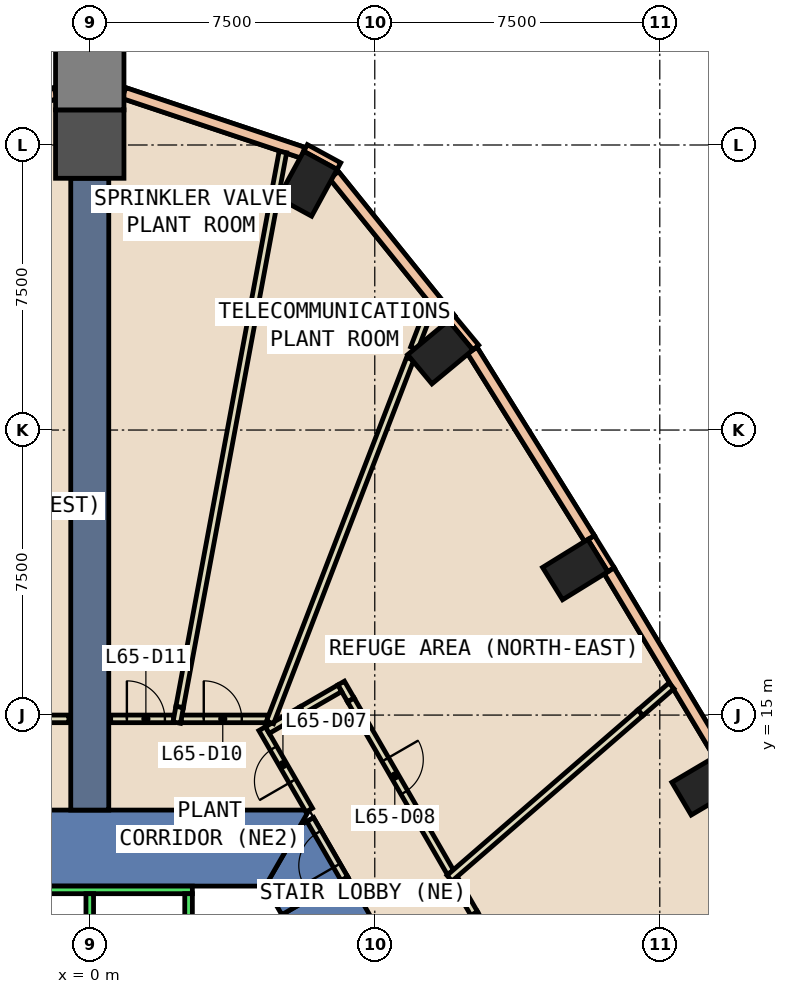
"""IFC4 building model, lengths in metres.
Left out: names, types, materials, properties, quantities, classifications, styles, units other than length and angle.
Written with IfcOpenShell. Run it as: python <this file> out.ifc"""

import sys

from ifc_helpers import new_model, si_unit, direction, frame, frame_2d, origin, origin_2d, place, context, subcontext, project, spatial, polyline, rectangle, outline, extrude, element, fill, save


model = new_model("IFC4")
c1 = context("Model", 3, precision=1e-05, world=origin(), true_north=direction((0.0, 1.0)))
c2 = subcontext(c1, "Body", "Model", "MODEL_VIEW")
j1 = project(units=[si_unit("LENGTHUNIT", "METRE"), si_unit("PLANEANGLEUNIT", "RADIAN")], contexts=[c1])
p1 = place(None, origin())
s1 = spatial("IfcSite", under=j1, at=p1, CompositionType="ELEMENT")
p2 = place(p1, origin())
s2 = spatial("IfcBuilding", under=s1, at=p2, CompositionType="ELEMENT")
p3 = place(p2, frame((0.0, 0.0, 281.0)))
s3 = spatial("IfcBuildingStorey", under=s2, at=p3, CompositionType="ELEMENT", Elevation=281.0)
for number, where, z_axis, x_axis in (
    (1, (16.175, 13.156, -0.6), (0.0, 0.0, 1.0), (-0.509, 0.861, 0.0)),
    (2, (12.774, 18.828, -0.6), (0.0, 0.0, 1.0), (-0.526, 0.851, 0.0)),
    (3, (9.223, 24.546, -0.6), (0.0, 0.0, 1.0), (-0.639, 0.769, 0.0)),
    (4, (5.734, 28.981, -0.6), (0.0, 0.0, 1.0), (-0.878, 0.478, 0.0)),
):
    element("IfcColumn", number, at=place(p3, frame(where, z_axis=z_axis, x_axis=x_axis)), inside=s3, PredefinedType="COLUMN", context=c2, shape_type="SweptSolid", body=[
        extrude(rectangle(XDim=1.0, YDim=1.4, at=origin_2d()), origin(), (0.0, 0.0, 1.0), 5.4),
    ])
for number, where, z_axis, x_axis in (
    (5, (0.0, 30.024, -0.6), (0.0, 0.0, 1.0), (0.0, 1.0, 0.0)),
    (6, (0.0, 31.824, -0.6), (0.0, 0.0, 1.0), (0.0, 1.0, 0.0)),
):
    element("IfcColumn", number, at=place(p3, frame(where, z_axis=z_axis, x_axis=x_axis)), inside=s3, PredefinedType="COLUMN", context=c2, shape_type="SweptSolid", body=[
        extrude(rectangle(XDim=1.8, YDim=1.8, at=origin_2d()), origin(), (0.0, 0.0, 1.0), 5.4),
    ])
p4 = place(p3, frame((0.0, 0.0, -0.6)))
e7 = element("IfcWall", 7, at=p4, inside=s3, PredefinedType="SHEAR", context=c2, shape_type="SweptSolid", body=[
    extrude(outline(polyline([(6.786, 10.747), (5.054, 9.747), (9.238, 2.5), (11.547, 2.5), (6.786, 10.747)])), origin(), (0.0, 0.0, 1.0), 5.4),
])
p5 = place(p3, frame((0.0, 0.0, 3.6)))
e8 = element("IfcWall", 8, at=p5, inside=s3, PredefinedType="SHEAR", context=c2, shape_type="SweptSolid", body=[
    extrude(outline(polyline([(5.889, 12.301), (5.544, 12.102), (4.619, 10.5), (5.054, 9.747), (6.786, 10.747), (5.889, 12.301)])), origin(), (0.0, 0.0, 1.0), 1.2),
])
p6 = place(p3, frame((0.0, 0.0, -0.6)))
e9 = element("IfcWall", 9, at=p6, inside=s3, PredefinedType="SHEAR", context=c2, shape_type="SweptSolid", body=[
    extrude(outline(polyline([(5.774, 12.5), (-5.774, 12.5), (-4.619, 10.5), (4.619, 10.5), (5.774, 12.5)])), origin(), (0.0, 0.0, 1.0), 5.4),
])
p7 = place(p3, frame((0.0, 12.5, 0.0), z_axis=(0.0, 0.0, 1.0), x_axis=(0.0, 1.0, 0.0)))
e10 = element("IfcWall", 10, at=p7, inside=s3, PredefinedType="SHEAR", context=c2, shape_type="SweptSolid", body=[
    extrude(rectangle(XDim=16.624, YDim=1.0, at=frame_2d((8.312, 0.0))), origin(), (0.0, 0.0, 1.0), 4.8),
])
p8 = place(p3, frame((6.556, 29.444, 0.0), z_axis=(0.0, 0.0, 1.0), x_axis=(-0.878250009632, 0.478201757191, 0.0)))
e11 = element("IfcWall", 11, at=p8, inside=s3, PredefinedType="STANDARD", context=c2, shape_type="SweptSolid", body=[
    extrude(rectangle(XDim=1.0, YDim=0.2, at=frame_2d((0.5, 0.0))), origin(), (0.0, 0.0, 1.0), 4.8),
])
p9 = place(p3, frame((13.718, 18.823, 0.0), z_axis=(0.0, 0.0, 1.0), x_axis=(-0.525825307325, 0.850592585306, 0.0)))
e12 = element("IfcWall", 12, at=p9, inside=s3, PredefinedType="STANDARD", context=c2, shape_type="SweptSolid", body=[
    extrude(rectangle(XDim=1.0, YDim=0.2, at=frame_2d((0.5, 0.0))), origin(), (0.0, 0.0, 1.0), 4.8),
])
p10 = place(p3, frame((10.157, 24.672, 0.0), z_axis=(0.0, 0.0, 1.0), x_axis=(-0.638092327136, 0.769959857428, 0.0)))
e13 = element("IfcWall", 13, at=p10, inside=s3, PredefinedType="STANDARD", context=c2, shape_type="SweptSolid", body=[
    extrude(rectangle(XDim=1.0, YDim=0.2, at=frame_2d((0.5, 0.0))), origin(), (0.0, 0.0, 1.0), 4.8),
])
p11 = place(p3, frame((16.564, 13.966, 0.0), z_axis=(0.0, 0.0, 1.0), x_axis=(-0.514272513936, 0.857626831092, 0.0)))
e14 = element("IfcWall", 14, at=p11, inside=s3, PredefinedType="STANDARD", context=c2, shape_type="SweptSolid", body=[
    extrude(rectangle(XDim=5.629, YDim=0.3, at=frame_2d((2.815, 0.0))), origin(), (0.0, 0.0, 1.0), 1.2),
])
p12 = place(p3, frame((16.564, 13.966, 4.0), z_axis=(0.0, 0.0, 1.0), x_axis=(-0.514272513936, 0.857626831092, 0.0)))
e15 = element("IfcWall", 15, at=p12, inside=s3, PredefinedType="STANDARD", context=c2, shape_type="SweptSolid", body=[
    extrude(rectangle(XDim=5.629, YDim=0.3, at=frame_2d((2.815, 0.0))), origin(), (0.0, 0.0, 1.0), 0.8),
])
p13 = place(p3, frame((13.149, 19.646, 0.0), z_axis=(0.0, 0.0, 1.0), x_axis=(-0.528722913279, 0.848794486889, 0.0)))
e16 = element("IfcWall", 16, at=p13, inside=s3, PredefinedType="STANDARD", context=c2, shape_type="SweptSolid", body=[
    extrude(rectangle(XDim=5.833, YDim=0.3, at=frame_2d((2.917, 0.0))), origin(), (0.0, 0.0, 1.0), 1.2),
])
p14 = place(p3, frame((13.149, 19.646, 4.0), z_axis=(0.0, 0.0, 1.0), x_axis=(-0.528722913279, 0.848794486889, 0.0)))
e17 = element("IfcWall", 17, at=p14, inside=s3, PredefinedType="STANDARD", context=c2, shape_type="SweptSolid", body=[
    extrude(rectangle(XDim=5.833, YDim=0.3, at=frame_2d((2.917, 0.0))), origin(), (0.0, 0.0, 1.0), 0.8),
])
p15 = place(p3, frame((9.486, 25.414, 0.0), z_axis=(0.0, 0.0, 1.0), x_axis=(-0.627683908381, 0.778468310954, 0.0)))
e18 = element("IfcWall", 18, at=p15, inside=s3, PredefinedType="STANDARD", context=c2, shape_type="SweptSolid", body=[
    extrude(rectangle(XDim=4.874, YDim=0.3, at=frame_2d((2.437, 0.0))), origin(), (0.0, 0.0, 1.0), 1.2),
])
p16 = place(p3, frame((9.486, 25.414, 4.0), z_axis=(0.0, 0.0, 1.0), x_axis=(-0.627683908381, 0.778468310954, 0.0)))
e19 = element("IfcWall", 19, at=p16, inside=s3, PredefinedType="STANDARD", context=c2, shape_type="SweptSolid", body=[
    extrude(rectangle(XDim=4.874, YDim=0.3, at=frame_2d((2.437, 0.0))), origin(), (0.0, 0.0, 1.0), 0.8),
])
p17 = place(p3, frame((5.611, 29.797, 0.0), z_axis=(0.0, 0.0, 1.0), x_axis=(-0.948737354495, 0.316065550459, 0.0)))
e20 = element("IfcWall", 20, at=p17, inside=s3, PredefinedType="STANDARD", context=c2, shape_type="SweptSolid", body=[
    extrude(rectangle(XDim=4.967, YDim=0.3, at=frame_2d((2.483, 0.0))), origin(), (0.0, 0.0, 1.0), 1.2),
])
p18 = place(p3, frame((5.611, 29.797, 4.0), z_axis=(0.0, 0.0, 1.0), x_axis=(-0.948737354495, 0.316065550459, 0.0)))
e21 = element("IfcWall", 21, at=p18, inside=s3, PredefinedType="STANDARD", context=c2, shape_type="SweptSolid", body=[
    extrude(rectangle(XDim=4.967, YDim=0.3, at=frame_2d((2.483, 0.0))), origin(), (0.0, 0.0, 1.0), 0.8),
])
p19 = place(p3, frame((-0.899, 31.367, 0.0), z_axis=(0.0, 0.0, 1.0), x_axis=(-0.948737354495, -0.316065550459, 0.0)))
e22 = element("IfcWall", 22, at=p19, inside=s3, PredefinedType="STANDARD", context=c2, shape_type="SweptSolid", body=[
    extrude(rectangle(XDim=4.967, YDim=0.3, at=frame_2d((2.483, 0.0))), origin(), (0.0, 0.0, 1.0), 1.2),
])
p20 = place(p3, frame((-0.899, 31.367, 4.0), z_axis=(0.0, 0.0, 1.0), x_axis=(-0.948737354495, -0.316065550459, 0.0)))
e23 = element("IfcWall", 23, at=p20, inside=s3, PredefinedType="STANDARD", context=c2, shape_type="SweptSolid", body=[
    extrude(rectangle(XDim=4.967, YDim=0.3, at=frame_2d((2.483, 0.0))), origin(), (0.0, 0.0, 1.0), 0.8),
])
p21 = place(p3, frame((10.165, 9.693, 0.0), z_axis=(0.0, 0.0, 1.0), x_axis=(-0.865955154139, -0.50012165622, 0.0)))
e24 = element("IfcWall", 24, at=p21, inside=s3, PredefinedType="PARTITIONING", context=c2, shape_type="SweptSolid", body=[
    extrude(rectangle(XDim=2.4, YDim=0.2, at=frame_2d((1.2, 0.0))), origin(), (0.0, 0.0, 1.0), 2.4),
])
p22 = place(p21, frame((0.6, 0.0, 0.0)))
e25 = element("IfcOpeningElement", 25, at=p22, cuts=e24, PredefinedType="OPENING", context=c2, shape_type="SweptSolid", body=[
    extrude(rectangle(XDim=1.0, YDim=2.1, at=frame_2d((0.5, 1.05))), frame((0.0, 0.11, 0.0), z_axis=(0.0, -1.0, 0.0), x_axis=(1.0, 0.0, 0.0)), (0.0, 0.0, 1.0), 0.22),
])
p23 = place(p3, frame((5.774, 12.5, 0.0), z_axis=(0.0, 0.0, 1.0), x_axis=(-0.500024335136, 0.866011353431, 0.0)))
e26 = element("IfcWall", 26, at=p23, inside=s3, PredefinedType="PARTITIONING", context=c2, shape_type="SweptSolid", body=[
    extrude(rectangle(XDim=2.474, YDim=0.2, at=frame_2d((1.237, 0.0))), origin(), (0.0, 0.0, 1.0), 4.8),
])
p24 = place(p23, frame((0.881, 0.0, 0.0)))
e27 = element("IfcOpeningElement", 27, at=p24, cuts=e26, PredefinedType="OPENING", context=c2, shape_type="SweptSolid", body=[
    extrude(rectangle(XDim=1.0, YDim=2.1, at=frame_2d((0.5, 1.05))), frame((0.0, 0.11, 0.0), z_axis=(0.0, -1.0, 0.0), x_axis=(1.0, 0.0, 0.0)), (0.0, 0.0, 1.0), 0.22),
])
p25 = place(p3, frame((4.674, 14.605, 0.0), z_axis=(0.0, 0.0, 1.0), x_axis=(0.865681519127, 0.500595153234, 0.0)))
e28 = element("IfcWall", 28, at=p25, inside=s3, PredefinedType="PARTITIONING", context=c2, shape_type="SweptSolid", body=[
    extrude(rectangle(XDim=0.589, YDim=0.2, at=frame_2d((0.294, 0.0))), origin(), (0.0, 0.0, 1.0), 4.8),
])
p26 = place(p3, frame((6.615, 15.842, 0.0), z_axis=(0.0, 0.0, 1.0), x_axis=(0.499571276714, -0.866272785837, 0.0)))
e29 = element("IfcWall", 29, at=p26, inside=s3, PredefinedType="PARTITIONING", context=c2, shape_type="SweptSolid", body=[
    extrude(rectangle(XDim=0.513, YDim=0.2, at=frame_2d((0.256, 0.0))), origin(), (0.0, 0.0, 1.0), 2.4),
])
p27 = place(p3, frame((5.184, 14.9, 0.0), z_axis=(0.0, 0.0, 1.0), x_axis=(0.865727674389, 0.500515328234, 0.0)))
e30 = element("IfcWall", 30, at=p27, inside=s3, PredefinedType="PARTITIONING", context=c2, shape_type="SweptSolid", body=[
    extrude(rectangle(XDim=0.462, YDim=0.2, at=frame_2d((0.231, 0.0))), origin(), (0.0, 0.0, 1.0), 4.8),
])
p28 = place(p3, frame((9.592, 10.685, 0.0), z_axis=(0.0, 0.0, 1.0), x_axis=(0.500366091518, -0.865813937552, 0.0)))
e31 = element("IfcWall", 31, at=p28, inside=s3, PredefinedType="PARTITIONING", context=c2, shape_type="SweptSolid", body=[
    extrude(rectangle(XDim=0.23, YDim=0.2, at=frame_2d((0.115, 0.0))), origin(), (0.0, 0.0, 1.0), 4.8),
])
p29 = place(p3, frame((10.115, 9.78, 0.0), z_axis=(0.0, 0.0, 1.0), x_axis=(0.500005696091, -0.86602211512, 0.0)))
e32 = element("IfcWall", 32, at=p29, inside=s3, PredefinedType="PARTITIONING", context=c2, shape_type="SweptSolid", body=[
    extrude(rectangle(XDim=5.82, YDim=0.2, at=frame_2d((2.91, 0.0))), origin(), (0.0, 0.0, 1.0), 2.4),
])
p30 = place(p3, frame((2.407, 14.9, 0.0), z_axis=(0.0, 0.0, 1.0), x_axis=(1.0, 0.0, 0.0)))
e33 = element("IfcWall", 33, at=p30, inside=s3, PredefinedType="PARTITIONING", context=c2, shape_type="SweptSolid", body=[
    extrude(rectangle(XDim=2.272, YDim=0.2, at=frame_2d((1.136, 0.0))), origin(), (0.0, 0.0, 1.0), 4.8),
])
p31 = place(p30, frame((0.593, 0.0, 0.0)))
e34 = element("IfcOpeningElement", 34, at=p31, cuts=e33, PredefinedType="OPENING", context=c2, shape_type="SweptSolid", body=[
    extrude(rectangle(XDim=1.0, YDim=2.1, at=frame_2d((0.5, 1.05))), frame((0.0, 0.11, 0.0), z_axis=(0.0, -1.0, 0.0), x_axis=(1.0, 0.0, 0.0)), (0.0, 0.0, 1.0), 0.22),
])
p32 = place(p3, frame((0.55, 14.9, 0.0), z_axis=(0.0, 0.0, 1.0), x_axis=(1.0, 0.0, 0.0)))
e35 = element("IfcWall", 35, at=p32, inside=s3, PredefinedType="PARTITIONING", context=c2, shape_type="SweptSolid", body=[
    extrude(rectangle(XDim=1.657, YDim=0.2, at=frame_2d((0.829, 0.0))), origin(), (0.0, 0.0, 1.0), 4.8),
])
p33 = place(p32, frame((0.427, 0.0, 0.0)))
e36 = element("IfcOpeningElement", 36, at=p33, cuts=e35, PredefinedType="OPENING", context=c2, shape_type="SweptSolid", body=[
    extrude(rectangle(XDim=1.0, YDim=2.1, at=frame_2d((0.5, 1.05))), frame((0.0, 0.11, 0.0), z_axis=(0.0, -1.0, 0.0), x_axis=(1.0, 0.0, 0.0)), (0.0, 0.0, 1.0), 0.22),
])
p34 = place(p3, frame((15.307, 15.77, 0.0), z_axis=(0.0, 0.0, 1.0), x_axis=(-0.755555277279, -0.655084897533, 0.0)))
e37 = element("IfcWall", 37, at=p34, inside=s3, PredefinedType="PARTITIONING", context=c2, shape_type="SweptSolid", body=[
    extrude(rectangle(XDim=1.084, YDim=0.2, at=frame_2d((0.542, 0.0))), origin(), (0.0, 0.0, 1.0), 2.4),
])
p35 = place(p3, frame((4.743, 14.807, 0.0), z_axis=(0.0, 0.0, 1.0), x_axis=(0.359634850081, 0.933093122152, 0.0)))
e38 = element("IfcWall", 38, at=p35, inside=s3, PredefinedType="PARTITIONING", context=c2, shape_type="SweptSolid", body=[
    extrude(rectangle(XDim=10.252, YDim=0.2, at=frame_2d((5.126, 0.0))), origin(), (0.0, 0.0, 1.0), 4.8),
])
p36 = place(p3, frame((8.538, 24.653, 0.0), z_axis=(0.0, 0.0, 1.0), x_axis=(0.359767534995, 0.933041971598, 0.0)))
e39 = element("IfcWall", 39, at=p36, inside=s3, PredefinedType="PARTITIONING", context=c2, shape_type="SweptSolid", body=[
    extrude(rectangle(XDim=1.162, YDim=0.2, at=frame_2d((0.581, 0.0))), origin(), (0.0, 0.0, 1.0), 2.4),
])
p37 = place(p3, frame((2.289, 14.802, 0.0), z_axis=(0.0, 0.0, 1.0), x_axis=(0.183025457922, 0.983108173983, 0.0)))
e40 = element("IfcWall", 40, at=p37, inside=s3, PredefinedType="PARTITIONING", context=c2, shape_type="SweptSolid", body=[
    extrude(rectangle(XDim=0.42, YDim=0.2, at=frame_2d((0.21, 0.0))), origin(), (0.0, 0.0, 1.0), 2.4),
])
p38 = place(p3, frame((0.0, 30.944, 0.0), z_axis=(0.0, 0.0, 1.0), x_axis=(0.0, 1.0, 0.0)))
e41 = element("IfcWall", 41, at=p38, inside=s3, PredefinedType="PARTITIONING", context=c2, shape_type="SweptSolid", body=[
    extrude(rectangle(XDim=0.501, YDim=0.2, at=frame_2d((0.25, 0.0))), origin(), (0.0, 0.0, 1.0), 4.8),
])
p39 = place(p3, frame((6.699, 10.697, 0.0), z_axis=(0.0, 0.0, 1.0), x_axis=(-0.499914839587, 0.866074565589, 0.0)))
e42 = element("IfcWall", 42, at=p39, inside=s3, PredefinedType="PARTITIONING", context=c2, shape_type="SweptSolid", body=[
    extrude(rectangle(XDim=1.794, YDim=0.2, at=frame_2d((0.897, 0.0))), origin(), (0.0, 0.0, 1.0), 2.4),
])
p40 = place(p39, frame((0.397, 0.0, 0.0)))
e43 = element("IfcOpeningElement", 43, at=p40, cuts=e42, PredefinedType="OPENING", context=c2, shape_type="SweptSolid", body=[
    extrude(rectangle(XDim=1.0, YDim=2.1, at=frame_2d((0.5, 1.05))), frame((0.0, 0.11, 0.0), z_axis=(0.0, -1.0, 0.0), x_axis=(1.0, 0.0, 0.0)), (0.0, 0.0, 1.0), 0.22),
])
p41 = place(p3, frame((6.871, 15.398, 0.0), z_axis=(0.0, 0.0, 1.0), x_axis=(0.500031573455, -0.866007174074, 0.0)))
e44 = element("IfcWall", 44, at=p41, inside=s3, PredefinedType="PARTITIONING", context=c2, shape_type="SweptSolid", body=[
    extrude(rectangle(XDim=5.241, YDim=0.2, at=frame_2d((2.621, 0.0))), origin(), (0.0, 0.0, 1.0), 4.8),
])
p42 = place(p41, frame((1.811, 0.0, 0.0)))
e45 = element("IfcOpeningElement", 45, at=p42, cuts=e44, PredefinedType="OPENING", context=c2, shape_type="SweptSolid", body=[
    extrude(rectangle(XDim=1.0, YDim=2.1, at=frame_2d((0.5, 1.05))), frame((0.0, 0.11, 0.0), z_axis=(0.0, -1.0, 0.0), x_axis=(1.0, 0.0, 0.0)), (0.0, 0.0, 1.0), 0.22),
])
p43 = place(p3, frame((5.584, 15.131, 0.0), z_axis=(0.0, 0.0, 1.0), x_axis=(0.865969483213, 0.500096844764, 0.0)))
e46 = element("IfcWall", 46, at=p43, inside=s3, PredefinedType="PARTITIONING", context=c2, shape_type="SweptSolid", body=[
    extrude(rectangle(XDim=1.148, YDim=0.2, at=frame_2d((0.574, 0.0))), origin(), (0.0, 0.0, 1.0), 2.4),
])
p44 = place(p3, frame((9.707, 10.486, 0.0), z_axis=(0.0, 0.0, 1.0), x_axis=(0.500292562113, -0.865856427068, 0.0)))
e47 = element("IfcWall", 47, at=p44, inside=s3, PredefinedType="PARTITIONING", context=c2, shape_type="SweptSolid", body=[
    extrude(rectangle(XDim=0.815, YDim=0.2, at=frame_2d((0.408, 0.0))), origin(), (0.0, 0.0, 1.0), 2.4),
])
p45 = place(p3, frame((14.488, 15.06, 0.0), z_axis=(0.0, 0.0, 1.0), x_axis=(-0.755567874399, -0.65507036811, 0.0)))
e48 = element("IfcWall", 48, at=p45, inside=s3, PredefinedType="PARTITIONING", context=c2, shape_type="SweptSolid", body=[
    extrude(rectangle(XDim=6.647, YDim=0.2, at=frame_2d((3.323, 0.0))), origin(), (0.0, 0.0, 1.0), 4.8),
])
p46 = place(p3, frame((2.366, 15.215, 0.0), z_axis=(0.0, 0.0, 1.0), x_axis=(0.182895721474, 0.983132318188, 0.0)))
e49 = element("IfcWall", 49, at=p46, inside=s3, PredefinedType="PARTITIONING", context=c2, shape_type="SweptSolid", body=[
    extrude(rectangle(XDim=14.85, YDim=0.2, at=frame_2d((7.425, 0.0))), origin(), (0.0, 0.0, 1.0), 4.8),
])
p47 = place(p3, frame((-2.373, 14.9, 0.0), z_axis=(0.0, 0.0, 1.0), x_axis=(1.0, 0.0, 0.0)))
e50 = element("IfcWall", 50, at=p47, inside=s3, PredefinedType="PARTITIONING", context=c2, shape_type="SweptSolid", body=[
    extrude(rectangle(XDim=1.823, YDim=0.2, at=frame_2d((0.912, 0.0))), origin(), (0.0, 0.0, 1.0), 4.8),
])
p48 = place(p3, frame((2.7, 10.4, 0.0), z_axis=(0.0, 0.0, 1.0), x_axis=(-1.0, 0.0, 0.0)))
e51 = element("IfcWall", 51, at=p48, inside=s3, PredefinedType="STANDARD", context=c2, shape_type="SweptSolid", body=[
    extrude(rectangle(XDim=5.4, YDim=0.2, at=frame_2d((2.7, 0.0))), origin(), (0.0, 0.0, 1.0), 4.8),
])
for number, where, z_axis, x_axis in (
    (52, (2.6, 7.9, 0.0), (0.0, 0.0, 1.0), (0.0, 1.0, 0.0)),
    (53, (0.0, 7.9, 0.0), (0.0, 0.0, 1.0), (0.0, 1.0, 0.0)),
):
    element("IfcWall", number, at=place(p3, frame(where, z_axis=z_axis, x_axis=x_axis)), inside=s3, PredefinedType="STANDARD", context=c2, shape_type="SweptSolid", body=[
        extrude(rectangle(XDim=2.4, YDim=0.2, at=frame_2d((1.2, 0.0))), origin(), (0.0, 0.0, 1.0), 4.8),
    ])
p49 = place(p24, origin())
e54 = element("IfcDoor", 54, at=p49, inside=s3, OperationType="SINGLE_SWING_RIGHT", PredefinedType="DOOR", context=c2, shape_type="SweptSolid", body=[
    extrude(rectangle(XDim=1.0, YDim=2.1, at=frame_2d((0.5, 1.05))), frame((0.0, 0.025, 0.0), z_axis=(0.0, -1.0, 0.0), x_axis=(1.0, 0.0, 0.0)), (0.0, 0.0, 1.0), 0.05),
])
fill(e27, e54)
p50 = place(p42, origin())
e55 = element("IfcDoor", 55, at=p50, inside=s3, OperationType="SINGLE_SWING_LEFT", PredefinedType="DOOR", context=c2, shape_type="SweptSolid", body=[
    extrude(rectangle(XDim=1.0, YDim=2.1, at=frame_2d((0.5, 1.05))), frame((0.0, 0.025, 0.0), z_axis=(0.0, -1.0, 0.0), x_axis=(1.0, 0.0, 0.0)), (0.0, 0.0, 1.0), 0.05),
])
fill(e45, e55)
p51 = place(p31, origin())
e56 = element("IfcDoor", 56, at=p51, inside=s3, OperationType="SINGLE_SWING_LEFT", PredefinedType="DOOR", context=c2, shape_type="SweptSolid", body=[
    extrude(rectangle(XDim=1.0, YDim=2.1, at=frame_2d((0.5, 1.05))), frame((0.0, 0.025, 0.0), z_axis=(0.0, -1.0, 0.0), x_axis=(1.0, 0.0, 0.0)), (0.0, 0.0, 1.0), 0.05),
])
fill(e34, e56)
p52 = place(p33, origin())
e57 = element("IfcDoor", 57, at=p52, inside=s3, OperationType="SINGLE_SWING_RIGHT", PredefinedType="DOOR", context=c2, shape_type="SweptSolid", body=[
    extrude(rectangle(XDim=1.0, YDim=2.1, at=frame_2d((0.5, 1.05))), frame((0.0, 0.025, 0.0), z_axis=(0.0, -1.0, 0.0), x_axis=(1.0, 0.0, 0.0)), (0.0, 0.0, 1.0), 0.05),
])
fill(e36, e57)
p53 = place(p40, origin())
e58 = element("IfcDoor", 58, at=p53, inside=s3, OperationType="SINGLE_SWING_LEFT", PredefinedType="DOOR", context=c2, shape_type="SweptSolid", body=[
    extrude(rectangle(XDim=1.0, YDim=2.1, at=frame_2d((0.5, 1.05))), frame((0.0, 0.025, 0.0), z_axis=(0.0, -1.0, 0.0), x_axis=(1.0, 0.0, 0.0)), (0.0, 0.0, 1.0), 0.05),
])
fill(e43, e58)
save(model, sys.argv[1])
